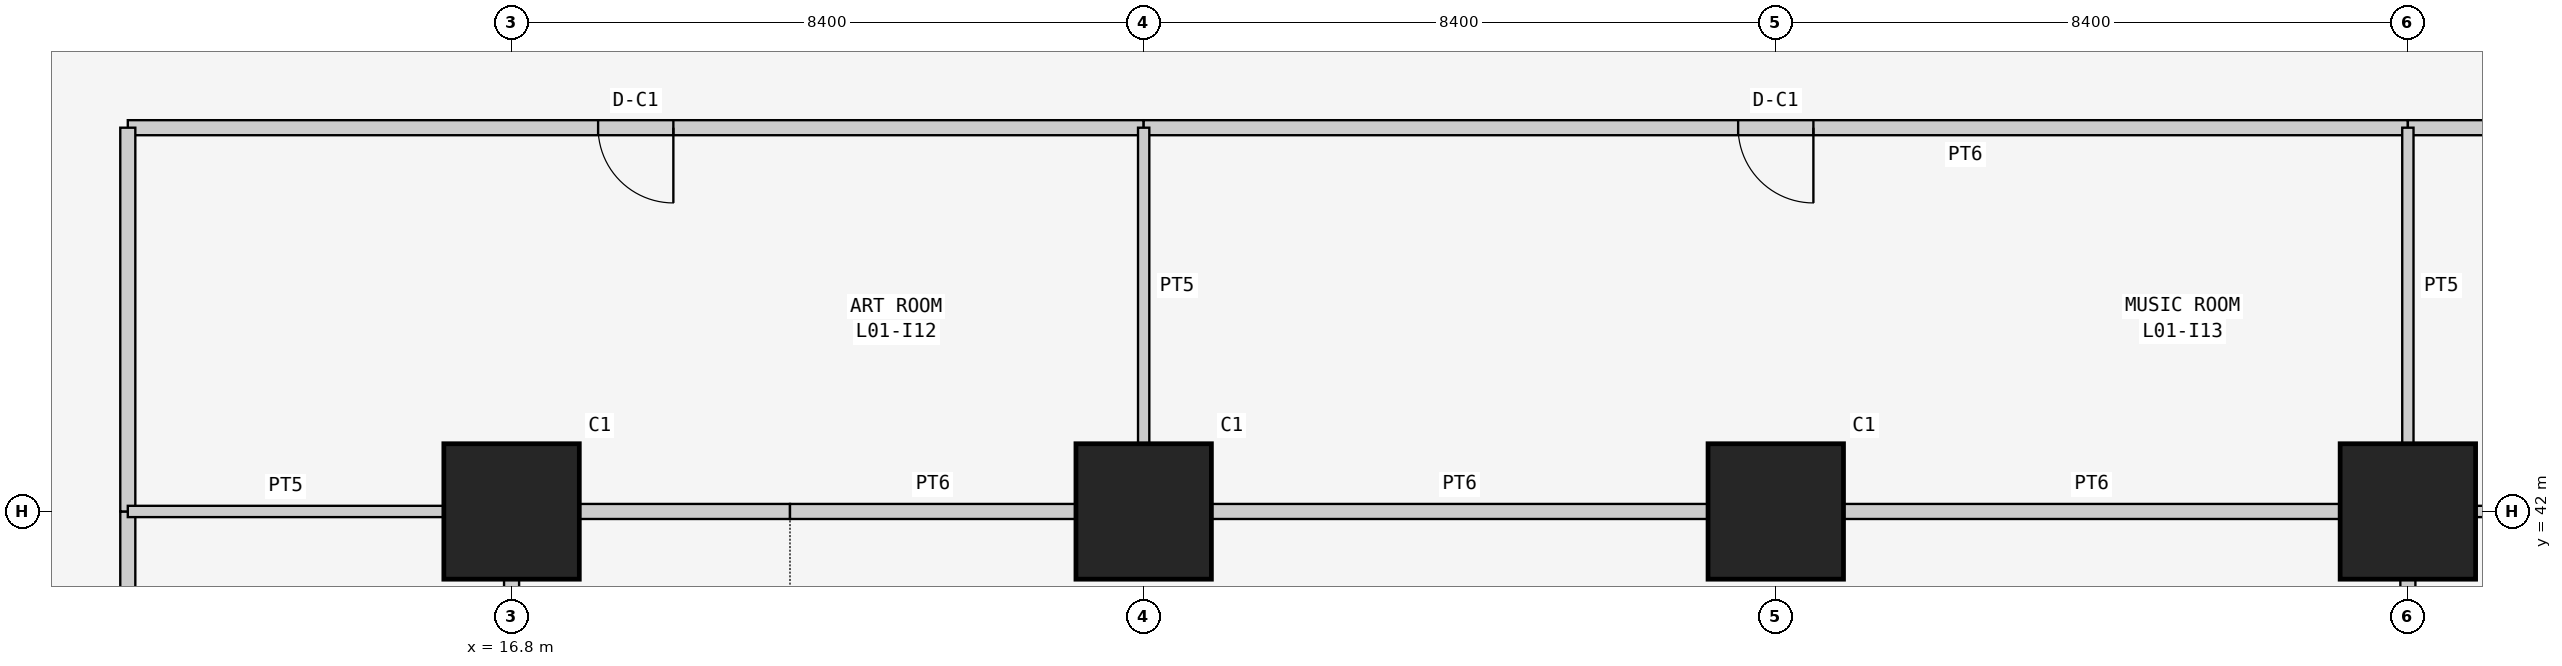
"""IFC4 building model, lengths in metres.
Left out: names, types, materials, properties, quantities, classifications, styles, units other than length and angle.
Written with IfcOpenShell. Run it as: python <this file> out.ifc"""

import sys

from ifc_helpers import new_model, si_unit, direction, frame, frame_2d, origin, origin_2d, place, context, subcontext, project, spatial, rectangle, extrude, element, fill, save


model = new_model("IFC4")
c1 = context("Model", 3, precision=1e-05, world=origin(), true_north=direction((0.0, 1.0)))
c2 = subcontext(c1, "Body", "Model", "MODEL_VIEW")
j1 = project(units=[si_unit("LENGTHUNIT", "METRE"), si_unit("PLANEANGLEUNIT", "RADIAN")], contexts=[c1])
p1 = place(None, origin())
s1 = spatial("IfcSite", under=j1, at=p1, CompositionType="ELEMENT")
p2 = place(p1, origin())
s2 = spatial("IfcBuilding", under=s1, at=p2, CompositionType="ELEMENT")
p3 = place(p2, frame((0.0, 0.0, 6.0)))
s3 = spatial("IfcBuildingStorey", under=s2, at=p3, CompositionType="ELEMENT", Elevation=6.0)
for number, where, z_axis, x_axis in (
    (1, (16.8, 42.0, 0.0), (0.0, 0.0, 1.0), (1.0, 0.0, 0.0)),
    (2, (25.2, 42.0, 0.0), (0.0, 0.0, 1.0), (1.0, 0.0, 0.0)),
    (3, (33.6, 42.0, 0.0), (0.0, 0.0, 1.0), (1.0, 0.0, 0.0)),
    (4, (42.0, 42.0, 0.0), (0.0, 0.0, 1.0), (1.0, 0.0, 0.0)),
):
    element("IfcColumn", number, at=place(p3, frame(where, z_axis=z_axis, x_axis=x_axis)), inside=s3, PredefinedType="COLUMN", context=c2, shape_type="SweptSolid", body=[
        extrude(rectangle(XDim=1.8, YDim=1.8, at=origin_2d()), origin(), (0.0, 0.0, 1.0), 4.5),
    ])
p4 = place(p3, frame((11.7, 42.0, 0.0), z_axis=(0.0, 0.0, 1.0), x_axis=(0.0, -1.0, 0.0)))
e5 = element("IfcWall", 5, at=p4, inside=s3, PredefinedType="PARTITIONING", context=c2, shape_type="SweptSolid", body=[
    extrude(rectangle(XDim=8.4, YDim=0.2, at=frame_2d((4.2, 0.0))), origin(), (0.0, 0.0, 1.0), 4.3),
])
p5 = place(p4, frame((3.7, 0.0, 0.0)))
e6 = element("IfcOpeningElement", 6, at=p5, cuts=e5, PredefinedType="OPENING", context=c2, shape_type="SweptSolid", body=[
    extrude(rectangle(XDim=1.0, YDim=2.1, at=frame_2d((0.5, 1.05))), frame((0.0, 0.11, 0.0), z_axis=(0.0, -1.0, 0.0), x_axis=(1.0, 0.0, 0.0)), (0.0, 0.0, 1.0), 0.22),
])
p6 = place(p3, frame((25.2, 47.1, 0.0), z_axis=(0.0, 0.0, 1.0), x_axis=(-1.0, 0.0, 0.0)))
e7 = element("IfcWall", 7, at=p6, inside=s3, PredefinedType="PARTITIONING", context=c2, shape_type="SweptSolid", body=[
    extrude(rectangle(XDim=13.5, YDim=0.2, at=frame_2d((6.75, 0.0))), origin(), (0.0, 0.0, 1.0), 4.3),
])
p7 = place(p6, frame((6.25, 0.0, 0.0)))
e8 = element("IfcOpeningElement", 8, at=p7, cuts=e7, PredefinedType="OPENING", context=c2, shape_type="SweptSolid", body=[
    extrude(rectangle(XDim=1.0, YDim=2.1, at=frame_2d((0.5, 1.05))), frame((0.0, 0.11, 0.0), z_axis=(0.0, -1.0, 0.0), x_axis=(1.0, 0.0, 0.0)), (0.0, 0.0, 1.0), 0.22),
])
p8 = place(p3, frame((11.7, 47.1, 0.0), z_axis=(0.0, 0.0, 1.0), x_axis=(0.0, -1.0, 0.0)))
e9 = element("IfcWall", 9, at=p8, inside=s3, PredefinedType="PARTITIONING", context=c2, shape_type="SweptSolid", body=[
    extrude(rectangle(XDim=5.1, YDim=0.2, at=frame_2d((2.55, 0.0))), origin(), (0.0, 0.0, 1.0), 4.3),
])
p9 = place(p3, frame((42.0, 47.1, 0.0), z_axis=(0.0, 0.0, 1.0), x_axis=(-1.0, 0.0, 0.0)))
e10 = element("IfcWall", 10, at=p9, inside=s3, PredefinedType="PARTITIONING", context=c2, shape_type="SweptSolid", body=[
    extrude(rectangle(XDim=16.8, YDim=0.2, at=frame_2d((8.4, 0.0))), origin(), (0.0, 0.0, 1.0), 4.3),
])
p10 = place(p9, frame((7.9, 0.0, 0.0)))
e11 = element("IfcOpeningElement", 11, at=p10, cuts=e10, PredefinedType="OPENING", context=c2, shape_type="SweptSolid", body=[
    extrude(rectangle(XDim=1.0, YDim=2.1, at=frame_2d((0.5, 1.05))), frame((0.0, 0.11, 0.0), z_axis=(0.0, -1.0, 0.0), x_axis=(1.0, 0.0, 0.0)), (0.0, 0.0, 1.0), 0.22),
])
p11 = place(p3, frame((47.1, 47.1, 0.0), z_axis=(0.0, 0.0, 1.0), x_axis=(-1.0, 0.0, 0.0)))
e12 = element("IfcWall", 12, at=p11, inside=s3, PredefinedType="PARTITIONING", context=c2, shape_type="SweptSolid", body=[
    extrude(rectangle(XDim=5.1, YDim=0.2, at=frame_2d((2.55, 0.0))), origin(), (0.0, 0.0, 1.0), 4.3),
])
p12 = place(p3, frame((16.8, 34.5, 0.0), z_axis=(0.0, 0.0, 1.0), x_axis=(0.0, 1.0, 0.0)))
e13 = element("IfcWall", 13, at=p12, inside=s3, PredefinedType="PARTITIONING", context=c2, shape_type="SweptSolid", body=[
    extrude(rectangle(XDim=6.6, YDim=0.2, at=frame_2d((3.3, 0.0))), origin(), (0.0, 0.0, 1.0), 3.543),
])
p13 = place(p3, frame((17.7, 42.0, 0.0), z_axis=(0.0, 0.0, 1.0), x_axis=(1.0, 0.0, 0.0)))
e14 = element("IfcWall", 14, at=p13, inside=s3, PredefinedType="PARTITIONING", context=c2, shape_type="SweptSolid", body=[
    extrude(rectangle(XDim=2.8, YDim=0.2, at=frame_2d((1.4, 0.0))), origin(), (0.0, 0.0, 1.0), 3.543),
])
p14 = place(p3, frame((42.0, 41.1, 0.0), z_axis=(0.0, 0.0, 1.0), x_axis=(0.0, -1.0, 0.0)))
e15 = element("IfcWall", 15, at=p14, inside=s3, PredefinedType="PARTITIONING", context=c2, shape_type="SweptSolid", body=[
    extrude(rectangle(XDim=6.6, YDim=0.2, at=frame_2d((3.3, 0.0))), origin(), (0.0, 0.0, 1.0), 3.543),
])
p15 = place(p3, frame((20.5, 42.0, 0.0), z_axis=(0.0, 0.0, 1.0), x_axis=(1.0, 0.0, 0.0)))
e16 = element("IfcWall", 16, at=p15, inside=s3, PredefinedType="PARTITIONING", context=c2, shape_type="SweptSolid", body=[
    extrude(rectangle(XDim=3.8, YDim=0.2, at=frame_2d((1.9, 0.0))), origin(), (0.0, 0.0, 1.0), 3.543),
])
p16 = place(p3, frame((26.1, 42.0, 0.0), z_axis=(0.0, 0.0, 1.0), x_axis=(1.0, 0.0, 0.0)))
e17 = element("IfcWall", 17, at=p16, inside=s3, PredefinedType="PARTITIONING", context=c2, shape_type="SweptSolid", body=[
    extrude(rectangle(XDim=6.6, YDim=0.2, at=frame_2d((3.3, 0.0))), origin(), (0.0, 0.0, 1.0), 3.543),
])
p17 = place(p3, frame((34.5, 42.0, 0.0), z_axis=(0.0, 0.0, 1.0), x_axis=(1.0, 0.0, 0.0)))
e18 = element("IfcWall", 18, at=p17, inside=s3, PredefinedType="PARTITIONING", context=c2, shape_type="SweptSolid", body=[
    extrude(rectangle(XDim=6.6, YDim=0.2, at=frame_2d((3.3, 0.0))), origin(), (0.0, 0.0, 1.0), 3.543),
])
p18 = place(p3, frame((11.7, 42.0, 0.0), z_axis=(0.0, 0.0, 1.0), x_axis=(1.0, 0.0, 0.0)))
e19 = element("IfcWall", 19, at=p18, inside=s3, PredefinedType="PARTITIONING", context=c2, shape_type="SweptSolid", body=[
    extrude(rectangle(XDim=4.2, YDim=0.15, at=frame_2d((2.1, 0.0))), origin(), (0.0, 0.0, 1.0), 3.543),
])
for number, where, z_axis, x_axis in (
    (20, (42.9, 42.0, 0.0), (0.0, 0.0, 1.0), (1.0, 0.0, 0.0)),
    (21, (25.2, 47.1, 0.0), (0.0, 0.0, 1.0), (0.0, -1.0, 0.0)),
    (22, (42.0, 47.1, 0.0), (0.0, 0.0, 1.0), (0.0, -1.0, 0.0)),
):
    element("IfcWall", number, at=place(p3, frame(where, z_axis=z_axis, x_axis=x_axis)), inside=s3, PredefinedType="PARTITIONING", context=c2, shape_type="SweptSolid", body=[
        extrude(rectangle(XDim=4.2, YDim=0.15, at=frame_2d((2.1, 0.0))), origin(), (0.0, 0.0, 1.0), 3.543),
    ])
p19 = place(p7, origin())
e23 = element("IfcDoor", 23, at=p19, inside=s3, OperationType="SINGLE_SWING_LEFT", PredefinedType="DOOR", context=c2, shape_type="SweptSolid", body=[
    extrude(rectangle(XDim=1.0, YDim=2.1, at=frame_2d((0.5, 1.05))), frame((0.0, 0.025, 0.0), z_axis=(0.0, -1.0, 0.0), x_axis=(1.0, 0.0, 0.0)), (0.0, 0.0, 1.0), 0.05),
])
fill(e8, e23)
p20 = place(p10, origin())
e24 = element("IfcDoor", 24, at=p20, inside=s3, OperationType="SINGLE_SWING_LEFT", PredefinedType="DOOR", context=c2, shape_type="SweptSolid", body=[
    extrude(rectangle(XDim=1.0, YDim=2.1, at=frame_2d((0.5, 1.05))), frame((0.0, 0.025, 0.0), z_axis=(0.0, -1.0, 0.0), x_axis=(1.0, 0.0, 0.0)), (0.0, 0.0, 1.0), 0.05),
])
fill(e11, e24)
save(model, sys.argv[1])
